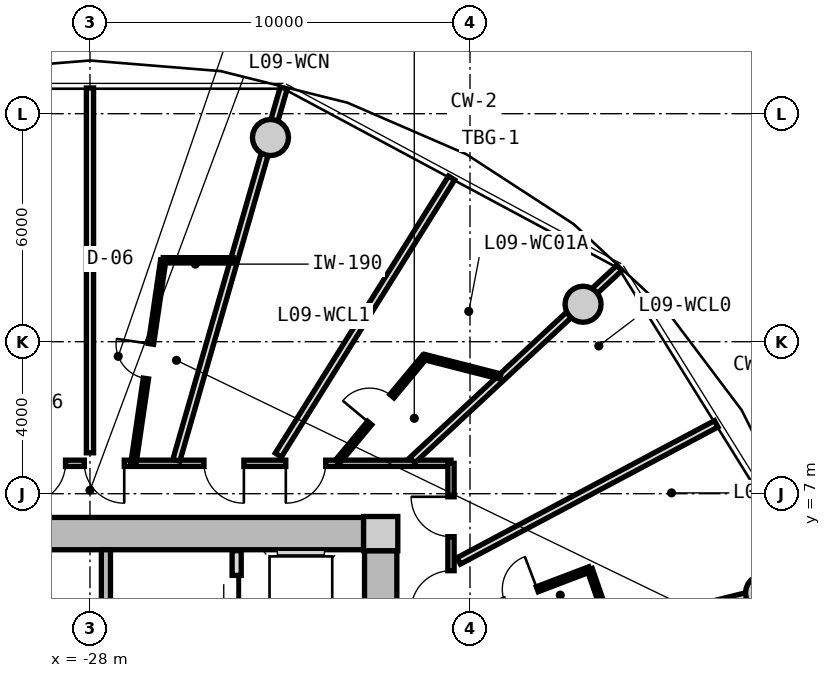
"""IFC4 building model, lengths in metres.
Left out: names, types, materials, properties, quantities, classifications, styles, units other than length and angle.
Written with IfcOpenShell. Run it as: python <this file> out.ifc"""

import sys

from ifc_helpers import new_model, si_unit, direction, frame, frame_2d, origin, origin_2d, place, context, subcontext, project, spatial, rectangle, circle, extrude, source, transform, mapped, element, fill, save


model = new_model("IFC4")
c1 = context("Model", 3, precision=1e-05, world=origin(), true_north=direction((0.0, 1.0)))
c2 = subcontext(c1, "Body", "Model", "MODEL_VIEW")
j1 = project(units=[si_unit("LENGTHUNIT", "METRE"), si_unit("PLANEANGLEUNIT", "RADIAN")], contexts=[c1])
p1 = place(None, origin())
s1 = spatial("IfcSite", under=j1, at=p1, CompositionType="ELEMENT")
p2 = place(p1, origin())
s2 = spatial("IfcBuilding", under=s1, at=p2, CompositionType="ELEMENT")
p3 = place(p2, frame((0.0, 0.0, 33.8)))
s3 = spatial("IfcBuildingStorey", under=s2, at=p3, CompositionType="ELEMENT", Elevation=33.8)
m1 = source(origin(), c2, "Body", "SweptSolid", [
    extrude(rectangle(XDim=0.9, YDim=0.9, at=origin_2d()), origin(), (0.0, 0.0, 1.0), 3.05),
])
p4 = place(p3, frame((-20.35, 5.95, 0.0), z_axis=(0.0, 0.0, 1.0), x_axis=(1.0, 0.0, 0.0)))
e1 = element("IfcColumn", 1, at=p4, inside=s3, PredefinedType="COLUMN", context=c2, shape_type="MappedRepresentation", body=[
    mapped(m1, transform((0.0, 0.0, 0.0), x_axis=(1.0, 0.0, 0.0), y_axis=(0.0, 1.0, 0.0), z_axis=(0.0, 0.0, 1.0), scale=1.0)),
])
m2 = source(origin(), c2, "Body", "SweptSolid", [
    extrude(rectangle(XDim=14.4, YDim=0.85, at=frame_2d((7.2, 0.0))), origin(), (0.0, 0.0, 1.0), 2.79),
])
p5 = place(p3, frame((-35.2, 5.95, 0.0), z_axis=(0.0, 0.0, 1.0), x_axis=(1.0, 0.0, 0.0)))
e2 = element("IfcWall", 2, at=p5, inside=s3, PredefinedType="SHEAR", context=c2, shape_type="MappedRepresentation", body=[
    mapped(m2, transform((0.0, 0.0, 0.0), x_axis=(1.0, 0.0, 0.0), y_axis=(0.0, 1.0, 0.0), z_axis=(0.0, 0.0, 1.0), scale=1.0)),
])
m3 = source(origin(), c2, "Body", "SweptSolid", [
    extrude(rectangle(XDim=11.0, YDim=0.85, at=frame_2d((5.5, 0.0))), origin(), (0.0, 0.0, 1.0), 2.79),
])
p6 = place(p3, frame((-20.35, 5.5, 0.0), z_axis=(0.0, 0.0, 1.0), x_axis=(0.0, -1.0, 0.0)))
e3 = element("IfcWall", 3, at=p6, inside=s3, PredefinedType="SHEAR", context=c2, shape_type="MappedRepresentation", body=[
    mapped(m3, transform((0.0, 0.0, 0.0), x_axis=(1.0, 0.0, 0.0), y_axis=(0.0, 1.0, 0.0), z_axis=(0.0, 0.0, 1.0), scale=1.0)),
])
p7 = place(p6, frame((5.65, 0.0, 0.0)))
e4 = element("IfcOpeningElement", 4, at=p7, cuts=e3, PredefinedType="OPENING", context=c2, shape_type="SweptSolid", body=[
    extrude(rectangle(XDim=1.2, YDim=2.15, at=frame_2d((0.6, 1.075))), frame((0.0, 0.435, 0.0), z_axis=(0.0, -1.0, 0.0), x_axis=(1.0, 0.0, 0.0)), (0.0, 0.0, 1.0), 0.87),
])
m4 = source(origin(), c2, "Body", "SweptSolid", [
    extrude(circle(Radius=0.475, at=origin_2d()), origin(), (0.0, 0.0, 1.0), 3.05),
])
for number, where, z_axis, x_axis in (
    (5, (-10.275, 4.387, 0.0), (0.0, 0.0, 1.0), (1.0, 0.0, 0.0)),
    (6, (-15.025, 11.985, 0.0), (0.0, 0.0, 1.0), (1.0, 0.0, 0.0)),
    (7, (-23.251, 16.373, 0.0), (0.0, 0.0, 1.0), (1.0, 0.0, 0.0)),
):
    element("IfcColumn", number, at=place(p3, frame(where, z_axis=z_axis, x_axis=x_axis)), inside=s3, PredefinedType="COLUMN", context=c2, shape_type="MappedRepresentation", body=[
        mapped(m4, transform((0.0, 0.0, 0.0), x_axis=(1.0, 0.0, 0.0), y_axis=(0.0, 1.0, 0.0), z_axis=(0.0, 0.0, 1.0), scale=1.0)),
    ])
m5 = source(origin(), c2, "Body", "SweptSolid", [
    extrude(rectangle(XDim=3.075, YDim=0.24, at=frame_2d((1.538, 0.0))), origin(), (0.0, 0.0, 1.0), 2.79),
])
p8 = place(p3, frame((-27.58, 2.45, 0.0), z_axis=(0.0, 0.0, 1.0), x_axis=(0.0, 1.0, 0.0)))
e8 = element("IfcWall", 8, at=p8, inside=s3, PredefinedType="PARTITIONING", context=c2, shape_type="MappedRepresentation", body=[
    mapped(m5, transform((0.0, 0.0, 0.0), x_axis=(1.0, 0.0, 0.0), y_axis=(0.0, 1.0, 0.0), z_axis=(0.0, 0.0, 1.0), scale=1.0)),
])
p9 = place(p8, frame((0.55, 0.0, 0.0)))
e9 = element("IfcOpeningElement", 9, at=p9, cuts=e8, PredefinedType="OPENING", context=c2, shape_type="SweptSolid", body=[
    extrude(rectangle(XDim=1.1, YDim=2.15, at=frame_2d((0.55, 1.075))), frame((0.0, 0.13, 0.0), z_axis=(0.0, -1.0, 0.0), x_axis=(1.0, 0.0, 0.0)), (0.0, 0.0, 1.0), 0.26),
])
m6 = source(origin(), c2, "Body", "SweptSolid", [
    extrude(rectangle(XDim=5.0, YDim=0.24, at=frame_2d((2.5, 0.0))), origin(), (0.0, 0.0, 1.0), 2.775),
])
p10 = place(p3, frame((-24.14, 0.5, 0.0), z_axis=(0.0, 0.0, 1.0), x_axis=(0.0, 1.0, 0.0)))
e10 = element("IfcWall", 10, at=p10, inside=s3, PredefinedType="PARTITIONING", context=c2, shape_type="MappedRepresentation", body=[
    mapped(m6, transform((0.0, 0.0, 0.0), x_axis=(1.0, 0.0, 0.0), y_axis=(0.0, 1.0, 0.0), z_axis=(0.0, 0.0, 1.0), scale=1.0)),
])
p11 = place(p10, frame((3.05, 0.0, 0.0)))
e11 = element("IfcOpeningElement", 11, at=p11, cuts=e10, PredefinedType="OPENING", context=c2, shape_type="SweptSolid", body=[
    extrude(rectangle(XDim=1.3, YDim=2.2, at=frame_2d((0.65, 1.1))), frame((0.0, 0.13, 0.0), z_axis=(0.0, -1.0, 0.0), x_axis=(1.0, 0.0, 0.0)), (0.0, 0.0, 1.0), 0.26),
])
p12 = place(p10, frame((0.55, 0.0, 0.0)))
e12 = element("IfcOpeningElement", 12, at=p12, cuts=e10, PredefinedType="OPENING", context=c2, shape_type="SweptSolid", body=[
    extrude(rectangle(XDim=1.3, YDim=2.2, at=frame_2d((0.65, 1.1))), frame((0.0, 0.13, 0.0), z_axis=(0.0, -1.0, 0.0), x_axis=(1.0, 0.0, 0.0)), (0.0, 0.0, 1.0), 0.26),
])
m7 = source(origin(), c2, "Body", "SweptSolid", [
    extrude(rectangle(XDim=19.0, YDim=0.165, at=frame_2d((9.5, 0.0))), origin(), (0.0, 0.0, 1.0), 2.775),
])
p13 = place(p3, frame((-37.5, 7.8, 0.0), z_axis=(0.0, 0.0, 1.0), x_axis=(1.0, 0.0, 0.0)))
e13 = element("IfcWall", 13, at=p13, inside=s3, PredefinedType="PARTITIONING", context=c2, shape_type="MappedRepresentation", body=[
    mapped(m7, transform((0.0, 0.0, 0.0), x_axis=(1.0, 0.0, 0.0), y_axis=(0.0, 1.0, 0.0), z_axis=(0.0, 0.0, 1.0), scale=1.0)),
])
p14 = place(p13, frame((9.352, 0.0, 0.0)))
e14 = element("IfcOpeningElement", 14, at=p14, cuts=e13, PredefinedType="OPENING", context=c2, shape_type="SweptSolid", body=[
    extrude(rectangle(XDim=1.05, YDim=2.15, at=frame_2d((0.525, 1.075))), frame((0.0, 0.093, 0.0), z_axis=(0.0, -1.0, 0.0), x_axis=(1.0, 0.0, 0.0)), (0.0, 0.0, 1.0), 0.185),
])
p15 = place(p13, frame((7.806, 0.0, 0.0)))
e15 = element("IfcOpeningElement", 15, at=p15, cuts=e13, PredefinedType="OPENING", context=c2, shape_type="SweptSolid", body=[
    extrude(rectangle(XDim=1.05, YDim=2.15, at=frame_2d((0.525, 1.075))), frame((0.0, 0.093, 0.0), z_axis=(0.0, -1.0, 0.0), x_axis=(1.0, 0.0, 0.0)), (0.0, 0.0, 1.0), 0.185),
])
p16 = place(p13, frame((4.773, 0.0, 0.0)))
e16 = element("IfcOpeningElement", 16, at=p16, cuts=e13, PredefinedType="OPENING", context=c2, shape_type="SweptSolid", body=[
    extrude(rectangle(XDim=1.05, YDim=2.15, at=frame_2d((0.525, 1.075))), frame((0.0, 0.093, 0.0), z_axis=(0.0, -1.0, 0.0), x_axis=(1.0, 0.0, 0.0)), (0.0, 0.0, 1.0), 0.185),
])
p17 = place(p13, frame((2.251, 0.0, 0.0)))
e17 = element("IfcOpeningElement", 17, at=p17, cuts=e13, PredefinedType="OPENING", context=c2, shape_type="SweptSolid", body=[
    extrude(rectangle(XDim=1.05, YDim=2.15, at=frame_2d((0.525, 1.075))), frame((0.0, 0.093, 0.0), z_axis=(0.0, -1.0, 0.0), x_axis=(1.0, 0.0, 0.0)), (0.0, 0.0, 1.0), 0.185),
])
p18 = place(p13, frame((14.653, 0.0, 0.0)))
e18 = element("IfcOpeningElement", 18, at=p18, cuts=e13, PredefinedType="OPENING", context=c2, shape_type="SweptSolid", body=[
    extrude(rectangle(XDim=1.05, YDim=2.15, at=frame_2d((0.525, 1.075))), frame((0.0, 0.093, 0.0), z_axis=(0.0, -1.0, 0.0), x_axis=(1.0, 0.0, 0.0)), (0.0, 0.0, 1.0), 0.185),
])
p19 = place(p13, frame((12.5, 0.0, 0.0)))
e19 = element("IfcOpeningElement", 19, at=p19, cuts=e13, PredefinedType="OPENING", context=c2, shape_type="SweptSolid", body=[
    extrude(rectangle(XDim=1.05, YDim=2.15, at=frame_2d((0.525, 1.075))), frame((0.0, 0.093, 0.0), z_axis=(0.0, -1.0, 0.0), x_axis=(1.0, 0.0, 0.0)), (0.0, 0.0, 1.0), 0.185),
])
m8 = source(origin(), c2, "Body", "SweptSolid", [
    extrude(rectangle(XDim=15.6, YDim=0.165, at=frame_2d((7.8, 0.0))), origin(), (0.0, 0.0, 1.0), 2.775),
])
p20 = place(p3, frame((-18.5, 7.8, 0.0), z_axis=(0.0, 0.0, 1.0), x_axis=(0.0, -1.0, 0.0)))
e20 = element("IfcWall", 20, at=p20, inside=s3, PredefinedType="PARTITIONING", context=c2, shape_type="MappedRepresentation", body=[
    mapped(m8, transform((0.0, 0.0, 0.0), x_axis=(1.0, 0.0, 0.0), y_axis=(0.0, 1.0, 0.0), z_axis=(0.0, 0.0, 1.0), scale=1.0)),
])
p21 = place(p20, frame((12.141, 0.0, 0.0)))
e21 = element("IfcOpeningElement", 21, at=p21, cuts=e20, PredefinedType="OPENING", context=c2, shape_type="SweptSolid", body=[
    extrude(rectangle(XDim=1.25, YDim=2.2, at=frame_2d((0.625, 1.1))), frame((0.0, 0.093, 0.0), z_axis=(0.0, -1.0, 0.0), x_axis=(1.0, 0.0, 0.0)), (0.0, 0.0, 1.0), 0.185),
])
p22 = place(p20, frame((7.175, 0.0, 0.0)))
e22 = element("IfcOpeningElement", 22, at=p22, cuts=e20, PredefinedType="OPENING", context=c2, shape_type="SweptSolid", body=[
    extrude(rectangle(XDim=1.25, YDim=2.2, at=frame_2d((0.625, 1.1))), frame((0.0, 0.093, 0.0), z_axis=(0.0, -1.0, 0.0), x_axis=(1.0, 0.0, 0.0)), (0.0, 0.0, 1.0), 0.185),
])
p23 = place(p20, frame((2.826, 0.0, 0.0)))
e23 = element("IfcOpeningElement", 23, at=p23, cuts=e20, PredefinedType="OPENING", context=c2, shape_type="SweptSolid", body=[
    extrude(rectangle(XDim=1.05, YDim=2.15, at=frame_2d((0.525, 1.075))), frame((0.0, 0.093, 0.0), z_axis=(0.0, -1.0, 0.0), x_axis=(1.0, 0.0, 0.0)), (0.0, 0.0, 1.0), 0.185),
])
p24 = place(p20, frame((0.881, 0.0, 0.0)))
e24 = element("IfcOpeningElement", 24, at=p24, cuts=e20, PredefinedType="OPENING", context=c2, shape_type="SweptSolid", body=[
    extrude(rectangle(XDim=1.05, YDim=2.15, at=frame_2d((0.525, 1.075))), frame((0.0, 0.093, 0.0), z_axis=(0.0, -1.0, 0.0), x_axis=(1.0, 0.0, 0.0)), (0.0, 0.0, 1.0), 0.185),
])
m9 = source(origin(), c2, "Body", "SweptSolid", [
    extrude(rectangle(XDim=10.196, YDim=0.19, at=frame_2d((5.098, 0.0))), origin(), (0.0, 0.0, 1.0), 2.225),
])
p25 = place(p3, frame((-25.727, 7.88, 0.0), z_axis=(0.0, 0.0, 1.0), x_axis=(0.277136420347, 0.960830580549, 0.0)))
e25 = element("IfcWall", 25, at=p25, inside=s3, PredefinedType="PARTITIONING", context=c2, shape_type="MappedRepresentation", body=[
    mapped(m9, transform((0.0, 0.0, 0.0), x_axis=(1.0, 0.0, 0.0), y_axis=(0.0, 1.0, 0.0), z_axis=(0.0, 0.0, 1.0), scale=1.0)),
])
m10 = source(origin(), c2, "Body", "SweptSolid", [
    extrude(rectangle(XDim=9.601, YDim=0.19, at=frame_2d((4.8, 0.0))), origin(), (0.0, 0.0, 1.0), 2.775),
])
p26 = place(p3, frame((-28.0, 8.076, 0.0), z_axis=(0.0, 0.0, 1.0), x_axis=(0.0, 1.0, 0.0)))
e26 = element("IfcWall", 26, at=p26, inside=s3, PredefinedType="PARTITIONING", context=c2, shape_type="MappedRepresentation", body=[
    mapped(m10, transform((0.0, 0.0, 0.0), x_axis=(1.0, 0.0, 0.0), y_axis=(0.0, 1.0, 0.0), z_axis=(0.0, 0.0, 1.0), scale=1.0)),
])
m11 = source(origin(), c2, "Body", "SweptSolid", [
    extrude(rectangle(XDim=5.37, YDim=0.14, at=frame_2d((2.685, 0.0))), origin(), (0.0, 0.0, 1.0), 2.775),
])
p27 = place(p3, frame((-26.851, 7.83, 0.0), z_axis=(0.0, 0.0, 1.0), x_axis=(0.145131397853, 0.989412389935, 0.0)))
e27 = element("IfcWall", 27, at=p27, inside=s3, PredefinedType="PARTITIONING", context=c2, shape_type="MappedRepresentation", body=[
    mapped(m11, transform((0.0, 0.0, 0.0), x_axis=(1.0, 0.0, 0.0), y_axis=(0.0, 1.0, 0.0), z_axis=(0.0, 0.0, 1.0), scale=1.0)),
])
p28 = place(p27, frame((2.225, 0.0, 0.0)))
e28 = element("IfcOpeningElement", 28, at=p28, cuts=e27, PredefinedType="OPENING", context=c2, shape_type="SweptSolid", body=[
    extrude(rectangle(XDim=0.92, YDim=2.1, at=frame_2d((0.46, 1.05))), frame((0.0, 0.08, 0.0), z_axis=(0.0, -1.0, 0.0), x_axis=(1.0, 0.0, 0.0)), (0.0, 0.0, 1.0), 0.16),
])
m12 = source(origin(), c2, "Body", "SweptSolid", [
    extrude(rectangle(XDim=1.843, YDim=0.14, at=frame_2d((0.921, 0.0))), origin(), (0.0, 0.0, 1.0), 2.775),
])
p29 = place(p3, frame((-26.072, 13.143, 0.0), z_axis=(0.0, 0.0, 1.0), x_axis=(0.999998937801, -0.001457531246, 0.0)))
e29 = element("IfcWall", 29, at=p29, inside=s3, PredefinedType="PARTITIONING", context=c2, shape_type="MappedRepresentation", body=[
    mapped(m12, transform((0.0, 0.0, 0.0), x_axis=(1.0, 0.0, 0.0), y_axis=(0.0, 1.0, 0.0), z_axis=(0.0, 0.0, 1.0), scale=1.0)),
])
m13 = source(origin(), c2, "Body", "SweptSolid", [
    extrude(rectangle(XDim=9.737, YDim=0.19, at=frame_2d((4.869, 0.0))), origin(), (0.0, 0.0, 1.0), 2.225),
])
p30 = place(p3, frame((-18.42, 2.385, 0.0), z_axis=(0.0, 0.0, 1.0), x_axis=(0.970392716238, 0.241532557375, 0.0)))
e30 = element("IfcWall", 30, at=p30, inside=s3, PredefinedType="PARTITIONING", context=c2, shape_type="MappedRepresentation", body=[
    mapped(m13, transform((0.0, 0.0, 0.0), x_axis=(1.0, 0.0, 0.0), y_axis=(0.0, 1.0, 0.0), z_axis=(0.0, 0.0, 1.0), scale=1.0)),
])
m14 = source(origin(), c2, "Body", "SweptSolid", [
    extrude(rectangle(XDim=7.435, YDim=0.19, at=frame_2d((3.717, 0.0))), origin(), (0.0, 0.0, 1.0), 2.225),
])
p31 = place(p3, frame((-19.517, 7.88, 0.0), z_axis=(0.0, 0.0, 1.0), x_axis=(0.732651956848, 0.680603489652, 0.0)))
e31 = element("IfcWall", 31, at=p31, inside=s3, PredefinedType="PARTITIONING", context=c2, shape_type="MappedRepresentation", body=[
    mapped(m14, transform((0.0, 0.0, 0.0), x_axis=(1.0, 0.0, 0.0), y_axis=(0.0, 1.0, 0.0), z_axis=(0.0, 0.0, 1.0), scale=1.0)),
])
m15 = source(origin(), c2, "Body", "SweptSolid", [
    extrude(rectangle(XDim=7.677, YDim=0.19, at=frame_2d((3.838, 0.0))), origin(), (0.0, 0.0, 1.0), 2.775),
])
p32 = place(p3, frame((-18.297, 5.231, 0.0), z_axis=(0.0, 0.0, 1.0), x_axis=(0.882725057546, 0.469889851753, 0.0)))
e32 = element("IfcWall", 32, at=p32, inside=s3, PredefinedType="PARTITIONING", context=c2, shape_type="MappedRepresentation", body=[
    mapped(m15, transform((0.0, 0.0, 0.0), x_axis=(1.0, 0.0, 0.0), y_axis=(0.0, 1.0, 0.0), z_axis=(0.0, 0.0, 1.0), scale=1.0)),
])
m16 = source(origin(), c2, "Body", "SweptSolid", [
    extrude(rectangle(XDim=3.874, YDim=0.14, at=frame_2d((1.937, 0.0))), origin(), (0.0, 0.0, 1.0), 2.775),
])
p33 = place(p3, frame((-18.47, 3.632, 0.0), z_axis=(0.0, 0.0, 1.0), x_axis=(0.934461775659, 0.35606346321, 0.0)))
e33 = element("IfcWall", 33, at=p33, inside=s3, PredefinedType="PARTITIONING", context=c2, shape_type="MappedRepresentation", body=[
    mapped(m16, transform((0.0, 0.0, 0.0), x_axis=(1.0, 0.0, 0.0), y_axis=(0.0, 1.0, 0.0), z_axis=(0.0, 0.0, 1.0), scale=1.0)),
])
p34 = place(p33, frame((1.477, 0.0, 0.0)))
e34 = element("IfcOpeningElement", 34, at=p34, cuts=e33, PredefinedType="OPENING", context=c2, shape_type="SweptSolid", body=[
    extrude(rectangle(XDim=0.92, YDim=2.1, at=frame_2d((0.46, 1.05))), frame((0.0, 0.08, 0.0), z_axis=(0.0, -1.0, 0.0), x_axis=(1.0, 0.0, 0.0)), (0.0, 0.0, 1.0), 0.16),
])
m17 = source(origin(), c2, "Body", "SweptSolid", [
    extrude(rectangle(XDim=1.676, YDim=0.14, at=frame_2d((0.838, 0.0))), origin(), (0.0, 0.0, 1.0), 2.775),
])
p35 = place(p3, frame((-14.85, 5.011, 0.0), z_axis=(0.0, 0.0, 1.0), x_axis=(0.327785970556, -0.944752008469, 0.0)))
e35 = element("IfcWall", 35, at=p35, inside=s3, PredefinedType="PARTITIONING", context=c2, shape_type="MappedRepresentation", body=[
    mapped(m17, transform((0.0, 0.0, 0.0), x_axis=(1.0, 0.0, 0.0), y_axis=(0.0, 1.0, 0.0), z_axis=(0.0, 0.0, 1.0), scale=1.0)),
])
m18 = source(origin(), c2, "Body", "SweptSolid", [
    extrude(rectangle(XDim=8.598, YDim=0.19, at=frame_2d((4.299, 0.0))), origin(), (0.0, 0.0, 1.0), 2.775),
])
p36 = place(p3, frame((-23.043, 8.017, 0.0), z_axis=(0.0, 0.0, 1.0), x_axis=(0.530039776395, 0.847972779893, 0.0)))
e36 = element("IfcWall", 36, at=p36, inside=s3, PredefinedType="PARTITIONING", context=c2, shape_type="MappedRepresentation", body=[
    mapped(m18, transform((0.0, 0.0, 0.0), x_axis=(1.0, 0.0, 0.0), y_axis=(0.0, 1.0, 0.0), z_axis=(0.0, 0.0, 1.0), scale=1.0)),
])
m19 = source(origin(), c2, "Body", "SweptSolid", [
    extrude(rectangle(XDim=3.594, YDim=0.14, at=frame_2d((1.797, 0.0))), origin(), (0.0, 0.0, 1.0), 2.775),
])
p37 = place(p3, frame((-21.496, 7.83, 0.0), z_axis=(0.0, 0.0, 1.0), x_axis=(0.639001147083, 0.769205781326, 0.0)))
e37 = element("IfcWall", 37, at=p37, inside=s3, PredefinedType="PARTITIONING", context=c2, shape_type="MappedRepresentation", body=[
    mapped(m19, transform((0.0, 0.0, 0.0), x_axis=(1.0, 0.0, 0.0), y_axis=(0.0, 1.0, 0.0), z_axis=(0.0, 0.0, 1.0), scale=1.0)),
])
p38 = place(p37, frame((1.337, 0.0, 0.0)))
e38 = element("IfcOpeningElement", 38, at=p38, cuts=e37, PredefinedType="OPENING", context=c2, shape_type="SweptSolid", body=[
    extrude(rectangle(XDim=0.92, YDim=2.1, at=frame_2d((0.46, 1.05))), frame((0.0, 0.08, 0.0), z_axis=(0.0, -1.0, 0.0), x_axis=(1.0, 0.0, 0.0)), (0.0, 0.0, 1.0), 0.16),
])
m20 = source(origin(), c2, "Body", "SweptSolid", [
    extrude(rectangle(XDim=2.062, YDim=0.14, at=frame_2d((1.031, 0.0))), origin(), (0.0, 0.0, 1.0), 2.415),
])
p39 = place(p3, frame((-19.199, 10.595, 0.0), z_axis=(0.0, 0.0, 1.0), x_axis=(0.968776253543, -0.247936626121, 0.0)))
e39 = element("IfcWall", 39, at=p39, inside=s3, PredefinedType="PARTITIONING", context=c2, shape_type="MappedRepresentation", body=[
    mapped(m20, transform((0.0, 0.0, 0.0), x_axis=(1.0, 0.0, 0.0), y_axis=(0.0, 1.0, 0.0), z_axis=(0.0, 0.0, 1.0), scale=1.0)),
])
m21 = source(origin(), c2, "Body", "SweptSolid", [
    extrude(rectangle(XDim=1.3, YDim=2.2, at=frame_2d((0.65, 1.1))), frame((0.0, 0.025, 0.0), z_axis=(0.0, -1.0, 0.0), x_axis=(1.0, 0.0, 0.0)), (0.0, 0.0, 1.0), 0.05),
])
p40 = place(p11, origin())
e40 = element("IfcDoor", 40, at=p40, inside=s3, OperationType="SLIDING_TO_LEFT", PredefinedType="DOOR", context=c2, shape_type="MappedRepresentation", body=[
    mapped(m21, transform((0.0, 0.0, 0.0), x_axis=(1.0, 0.0, 0.0), y_axis=(0.0, 1.0, 0.0), z_axis=(0.0, 0.0, 1.0), scale=1.0)),
])
fill(e11, e40)
m22 = source(origin(), c2, "Body", "SweptSolid", [
    extrude(rectangle(XDim=1.05, YDim=2.15, at=frame_2d((0.525, 1.075))), frame((0.0, 0.025, 0.0), z_axis=(0.0, -1.0, 0.0), x_axis=(1.0, 0.0, 0.0)), (0.0, 0.0, 1.0), 0.05),
])
p41 = place(p14, frame((1.05, 0.0, 0.0), z_axis=(0.0, 0.0, 1.0), x_axis=(-1.0, 0.0, 0.0)))
e41 = element("IfcDoor", 41, at=p41, inside=s3, OperationType="SINGLE_SWING_LEFT", PredefinedType="DOOR", context=c2, shape_type="MappedRepresentation", body=[
    mapped(m22, transform((0.0, 0.0, 0.0), x_axis=(1.0, 0.0, 0.0), y_axis=(0.0, 1.0, 0.0), z_axis=(0.0, 0.0, 1.0), scale=1.0)),
])
fill(e14, e41)
m23 = source(origin(), c2, "Body", "SweptSolid", [
    extrude(rectangle(XDim=0.92, YDim=2.1, at=frame_2d((0.46, 1.05))), frame((0.0, 0.025, 0.0), z_axis=(0.0, -1.0, 0.0), x_axis=(1.0, 0.0, 0.0)), (0.0, 0.0, 1.0), 0.05),
])
p42 = place(p28, origin())
e42 = element("IfcDoor", 42, at=p42, inside=s3, OperationType="SINGLE_SWING_RIGHT", PredefinedType="DOOR", context=c2, shape_type="MappedRepresentation", body=[
    mapped(m23, transform((0.0, 0.0, 0.0), x_axis=(1.0, 0.0, 0.0), y_axis=(0.0, 1.0, 0.0), z_axis=(0.0, 0.0, 1.0), scale=1.0)),
])
fill(e28, e42)
p43 = place(p15, frame((1.05, 0.0, 0.0), z_axis=(0.0, 0.0, 1.0), x_axis=(-1.0, 0.0, 0.0)))
e43 = element("IfcDoor", 43, at=p43, inside=s3, OperationType="SINGLE_SWING_RIGHT", PredefinedType="DOOR", context=c2, shape_type="MappedRepresentation", body=[
    mapped(m22, transform((0.0, 0.0, 0.0), x_axis=(1.0, 0.0, 0.0), y_axis=(0.0, 1.0, 0.0), z_axis=(0.0, 0.0, 1.0), scale=1.0)),
])
fill(e15, e43)
p44 = place(p23, frame((1.05, 0.0, 0.0), z_axis=(0.0, 0.0, 1.0), x_axis=(-1.0, 0.0, 0.0)))
e44 = element("IfcDoor", 44, at=p44, inside=s3, OperationType="SINGLE_SWING_LEFT", PredefinedType="DOOR", context=c2, shape_type="MappedRepresentation", body=[
    mapped(m22, transform((0.0, 0.0, 0.0), x_axis=(1.0, 0.0, 0.0), y_axis=(0.0, 1.0, 0.0), z_axis=(0.0, 0.0, 1.0), scale=1.0)),
])
fill(e23, e44)
p45 = place(p34, origin())
e45 = element("IfcDoor", 45, at=p45, inside=s3, OperationType="SINGLE_SWING_RIGHT", PredefinedType="DOOR", context=c2, shape_type="MappedRepresentation", body=[
    mapped(m23, transform((0.0, 0.0, 0.0), x_axis=(1.0, 0.0, 0.0), y_axis=(0.0, 1.0, 0.0), z_axis=(0.0, 0.0, 1.0), scale=1.0)),
])
fill(e34, e45)
p46 = place(p24, frame((1.05, 0.0, 0.0), z_axis=(0.0, 0.0, 1.0), x_axis=(-1.0, 0.0, 0.0)))
e46 = element("IfcDoor", 46, at=p46, inside=s3, OperationType="SINGLE_SWING_RIGHT", PredefinedType="DOOR", context=c2, shape_type="MappedRepresentation", body=[
    mapped(m22, transform((0.0, 0.0, 0.0), x_axis=(1.0, 0.0, 0.0), y_axis=(0.0, 1.0, 0.0), z_axis=(0.0, 0.0, 1.0), scale=1.0)),
])
fill(e24, e46)
p47 = place(p18, frame((1.05, 0.0, 0.0), z_axis=(0.0, 0.0, 1.0), x_axis=(-1.0, 0.0, 0.0)))
e47 = element("IfcDoor", 47, at=p47, inside=s3, OperationType="SINGLE_SWING_RIGHT", PredefinedType="DOOR", context=c2, shape_type="MappedRepresentation", body=[
    mapped(m22, transform((0.0, 0.0, 0.0), x_axis=(1.0, 0.0, 0.0), y_axis=(0.0, 1.0, 0.0), z_axis=(0.0, 0.0, 1.0), scale=1.0)),
])
fill(e18, e47)
p48 = place(p38, origin())
e48 = element("IfcDoor", 48, at=p48, inside=s3, OperationType="SINGLE_SWING_LEFT", PredefinedType="DOOR", context=c2, shape_type="MappedRepresentation", body=[
    mapped(m23, transform((0.0, 0.0, 0.0), x_axis=(1.0, 0.0, 0.0), y_axis=(0.0, 1.0, 0.0), z_axis=(0.0, 0.0, 1.0), scale=1.0)),
])
fill(e38, e48)
p49 = place(p19, frame((1.05, 0.0, 0.0), z_axis=(0.0, 0.0, 1.0), x_axis=(-1.0, 0.0, 0.0)))
e49 = element("IfcDoor", 49, at=p49, inside=s3, OperationType="SINGLE_SWING_LEFT", PredefinedType="DOOR", context=c2, shape_type="MappedRepresentation", body=[
    mapped(m22, transform((0.0, 0.0, 0.0), x_axis=(1.0, 0.0, 0.0), y_axis=(0.0, 1.0, 0.0), z_axis=(0.0, 0.0, 1.0), scale=1.0)),
])
fill(e19, e49)
save(model, sys.argv[1])
